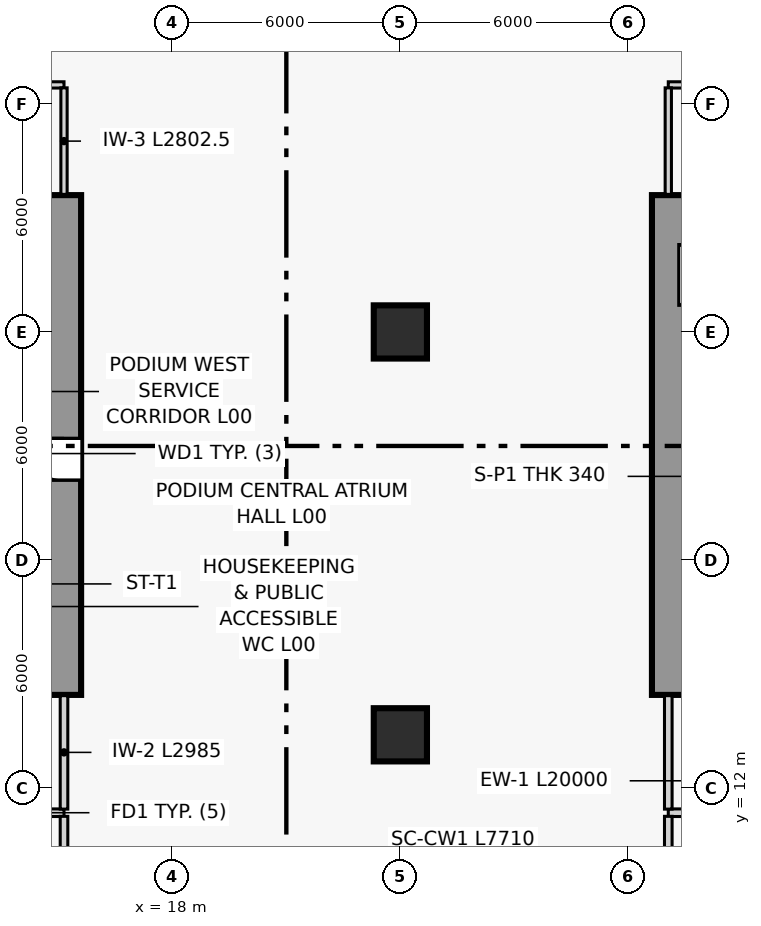
"""IFC4 building model, lengths in metres.
Left out: names, types, materials, properties, quantities, classifications, styles, units other than length and angle.
Written with IfcOpenShell. Run it as: python <this file> out.ifc"""

import sys

from ifc_helpers import new_model, si_unit, direction, frame, frame_2d, origin, origin_2d, place, context, subcontext, project, spatial, rectangle, extrude, source, transform, mapped, element, fill, save


model = new_model("IFC4")
c1 = context("Model", 3, precision=1e-05, world=origin(), true_north=direction((0.0, 1.0)))
c2 = subcontext(c1, "Body", "Model", "MODEL_VIEW")
j1 = project(units=[si_unit("LENGTHUNIT", "METRE"), si_unit("PLANEANGLEUNIT", "RADIAN")], contexts=[c1])
p1 = place(None, origin())
s1 = spatial("IfcSite", under=j1, at=p1, CompositionType="ELEMENT")
p2 = place(p1, origin())
s2 = spatial("IfcBuilding", under=s1, at=p2, CompositionType="ELEMENT")
p3 = place(p2, origin())
s3 = spatial("IfcBuildingStorey", under=s2, at=p3, CompositionType="ELEMENT", Elevation=0.0)
p4 = place(p3, frame((15.15, 14.45, 0.0), z_axis=(0.0, 0.0, 1.0), x_axis=(0.0, 1.0, 0.0)))
e1 = element("IfcWall", 1, at=p4, inside=s3, PredefinedType="SHEAR", context=c2, shape_type="SweptSolid", body=[
    extrude(rectangle(XDim=13.15, YDim=0.9, at=frame_2d((6.575, 0.0))), origin(), (0.0, 0.0, 1.0), 4.5),
])
p5 = place(p4, frame((5.65, 0.0, 0.0)))
e2 = element("IfcOpeningElement", 2, at=p5, cuts=e1, PredefinedType="OPENING", context=c2, shape_type="SweptSolid", body=[
    extrude(rectangle(XDim=1.1, YDim=2.2, at=frame_2d((0.55, 1.1))), frame((0.0, 0.46, 0.0), z_axis=(0.0, -1.0, 0.0), x_axis=(1.0, 0.0, 0.0)), (0.0, 0.0, 1.0), 0.92),
])
p6 = place(p3, frame((31.07, 14.45, 0.0), z_axis=(0.0, 0.0, 1.0), x_axis=(0.0, 1.0, 0.0)))
e3 = element("IfcWall", 3, at=p6, inside=s3, PredefinedType="SHEAR", context=c2, shape_type="SweptSolid", body=[
    extrude(rectangle(XDim=13.15, YDim=0.9, at=frame_2d((6.575, 0.0))), origin(), (0.0, 0.0, 1.0), 4.5),
])
m1 = source(origin(), c2, "Body", "SweptSolid", [
    extrude(rectangle(XDim=1.4, YDim=1.4, at=origin_2d()), origin(), (0.0, 0.0, 1.0), 4.5),
])
for number, where, z_axis, x_axis in (
    (4, (24.0, 13.4, 0.0), (0.0, 0.0, 1.0), (1.0, 0.0, 0.0)),
    (5, (24.0, 24.0, 0.0), (0.0, 0.0, 1.0), (1.0, 0.0, 0.0)),
):
    element("IfcColumn", number, at=place(p3, frame(where, z_axis=z_axis, x_axis=x_axis)), inside=s3, PredefinedType="COLUMN", context=c2, shape_type="MappedRepresentation", body=[
        mapped(m1, transform((0.0, 0.0, 0.0), scale=1.0)),
    ])
p7 = place(p3, frame((8.05, 11.35, 0.0), z_axis=(0.0, 0.0, 1.0), x_axis=(1.0, 0.0, 0.0)))
e6 = element("IfcWall", 6, at=p7, inside=s3, PredefinedType="PARTITIONING", context=c2, shape_type="SweptSolid", body=[
    extrude(rectangle(XDim=7.1, YDim=0.2, at=frame_2d((3.55, 0.0))), origin(), (0.0, 0.0, 1.0), 4.16),
])
p8 = place(p7, frame((2.846, 0.0, 0.0)))
e7 = element("IfcOpeningElement", 7, at=p8, cuts=e6, PredefinedType="OPENING", context=c2, shape_type="SweptSolid", body=[
    extrude(rectangle(XDim=1.2, YDim=2.2, at=frame_2d((0.6, 1.1))), frame((0.0, 0.11, 0.0), z_axis=(0.0, -1.0, 0.0), x_axis=(1.0, 0.0, 0.0)), (0.0, 0.0, 1.0), 0.22),
])
p9 = place(p3, frame((15.15, 11.445, 0.0), z_axis=(0.0, 0.0, 1.0), x_axis=(0.0, 1.0, 0.0)))
e8 = element("IfcWall", 8, at=p9, inside=s3, PredefinedType="PARTITIONING", context=c2, shape_type="SweptSolid", body=[
    extrude(rectangle(XDim=2.985, YDim=0.2, at=frame_2d((1.492, 0.0))), origin(), (0.0, 0.0, 1.0), 4.16),
])
p10 = place(p3, frame((31.05, 11.35, 0.0), z_axis=(0.0, 0.0, 1.0), x_axis=(1.0, 0.0, 0.0)))
e9 = element("IfcWall", 9, at=p10, inside=s3, PredefinedType="PARTITIONING", context=c2, shape_type="SweptSolid", body=[
    extrude(rectangle(XDim=6.2, YDim=0.2, at=frame_2d((3.1, 0.0))), origin(), (0.0, 0.0, 1.0), 4.16),
])
p11 = place(p10, frame((2.586, 0.0, 0.0)))
e10 = element("IfcOpeningElement", 10, at=p11, cuts=e9, PredefinedType="OPENING", context=c2, shape_type="SweptSolid", body=[
    extrude(rectangle(XDim=1.2, YDim=2.2, at=frame_2d((0.6, 1.1))), frame((0.0, 0.11, 0.0), z_axis=(0.0, -1.0, 0.0), x_axis=(1.0, 0.0, 0.0)), (0.0, 0.0, 1.0), 0.22),
])
p12 = place(p3, frame((31.05, 11.445, 0.0), z_axis=(0.0, 0.0, 1.0), x_axis=(0.0, 1.0, 0.0)))
e11 = element("IfcWall", 11, at=p12, inside=s3, PredefinedType="PARTITIONING", context=c2, shape_type="SweptSolid", body=[
    extrude(rectangle(XDim=2.985, YDim=0.2, at=frame_2d((1.492, 0.0))), origin(), (0.0, 0.0, 1.0), 4.16),
])
p13 = place(p3, frame((8.05, 30.5, 0.0), z_axis=(0.0, 0.0, 1.0), x_axis=(1.0, 0.0, 0.0)))
e12 = element("IfcWall", 12, at=p13, inside=s3, PredefinedType="PARTITIONING", context=c2, shape_type="SweptSolid", body=[
    extrude(rectangle(XDim=7.1, YDim=0.165, at=frame_2d((3.55, 0.0))), origin(), (0.0, 0.0, 1.0), 4.16),
])
p14 = place(p13, frame((2.95, 0.0, 0.0)))
e13 = element("IfcOpeningElement", 13, at=p14, cuts=e12, PredefinedType="OPENING", context=c2, shape_type="SweptSolid", body=[
    extrude(rectangle(XDim=1.2, YDim=2.2, at=frame_2d((0.6, 1.1))), frame((0.0, 0.093, 0.0), z_axis=(0.0, -1.0, 0.0), x_axis=(1.0, 0.0, 0.0)), (0.0, 0.0, 1.0), 0.185),
])
p15 = place(p3, frame((15.15, 27.62, 0.0), z_axis=(0.0, 0.0, 1.0), x_axis=(0.0, 1.0, 0.0)))
e14 = element("IfcWall", 14, at=p15, inside=s3, PredefinedType="PARTITIONING", context=c2, shape_type="SweptSolid", body=[
    extrude(rectangle(XDim=2.802, YDim=0.165, at=frame_2d((1.401, 0.0))), origin(), (0.0, 0.0, 1.0), 4.16),
])
p16 = place(p3, frame((31.05, 30.5, 0.0), z_axis=(0.0, 0.0, 1.0), x_axis=(1.0, 0.0, 0.0)))
e15 = element("IfcWall", 15, at=p16, inside=s3, PredefinedType="PARTITIONING", context=c2, shape_type="SweptSolid", body=[
    extrude(rectangle(XDim=6.2, YDim=0.165, at=frame_2d((3.1, 0.0))), origin(), (0.0, 0.0, 1.0), 4.16),
])
p17 = place(p16, frame((2.5, 0.0, 0.0)))
e16 = element("IfcOpeningElement", 16, at=p17, cuts=e15, PredefinedType="OPENING", context=c2, shape_type="SweptSolid", body=[
    extrude(rectangle(XDim=1.2, YDim=2.2, at=frame_2d((0.6, 1.1))), frame((0.0, 0.093, 0.0), z_axis=(0.0, -1.0, 0.0), x_axis=(1.0, 0.0, 0.0)), (0.0, 0.0, 1.0), 0.185),
])
p18 = place(p3, frame((31.05, 27.62, 0.0), z_axis=(0.0, 0.0, 1.0), x_axis=(0.0, 1.0, 0.0)))
e17 = element("IfcWall", 17, at=p18, inside=s3, PredefinedType="PARTITIONING", context=c2, shape_type="SweptSolid", body=[
    extrude(rectangle(XDim=2.802, YDim=0.165, at=frame_2d((1.401, 0.0))), origin(), (0.0, 0.0, 1.0), 4.16),
])
p19 = place(p3, frame((15.15, 9.515, 0.0), z_axis=(0.0, 0.0, 1.0), x_axis=(0.0, 1.0, 0.0)))
e18 = element("IfcWall", 18, at=p19, inside=s3, PredefinedType="PARTITIONING", context=c2, shape_type="SweptSolid", body=[
    extrude(rectangle(XDim=1.74, YDim=0.2, at=frame_2d((0.87, 0.0))), origin(), (0.0, 0.0, 1.0), 4.16),
])
p20 = place(p3, frame((31.05, 9.475, 0.0), z_axis=(0.0, 0.0, 1.0), x_axis=(0.0, 1.0, 0.0)))
e19 = element("IfcWall", 19, at=p20, inside=s3, PredefinedType="PARTITIONING", context=c2, shape_type="SweptSolid", body=[
    extrude(rectangle(XDim=1.78, YDim=0.2, at=frame_2d((0.89, 0.0))), origin(), (0.0, 0.0, 1.0), 4.16),
])
m2 = source(origin(), c2, "Body", "SweptSolid", [
    extrude(rectangle(XDim=1.1, YDim=2.2, at=frame_2d((0.55, 1.1))), frame((0.0, 0.025, 0.0), z_axis=(0.0, -1.0, 0.0), x_axis=(1.0, 0.0, 0.0)), (0.0, 0.0, 1.0), 0.05),
])
p21 = place(p5, origin())
e20 = element("IfcDoor", 20, at=p21, inside=s3, OperationType="SINGLE_SWING_RIGHT", PredefinedType="DOOR", context=c2, shape_type="MappedRepresentation", body=[
    mapped(m2, transform((0.0, 0.0, 0.0), scale=1.0)),
])
fill(e2, e20)
save(model, sys.argv[1])
